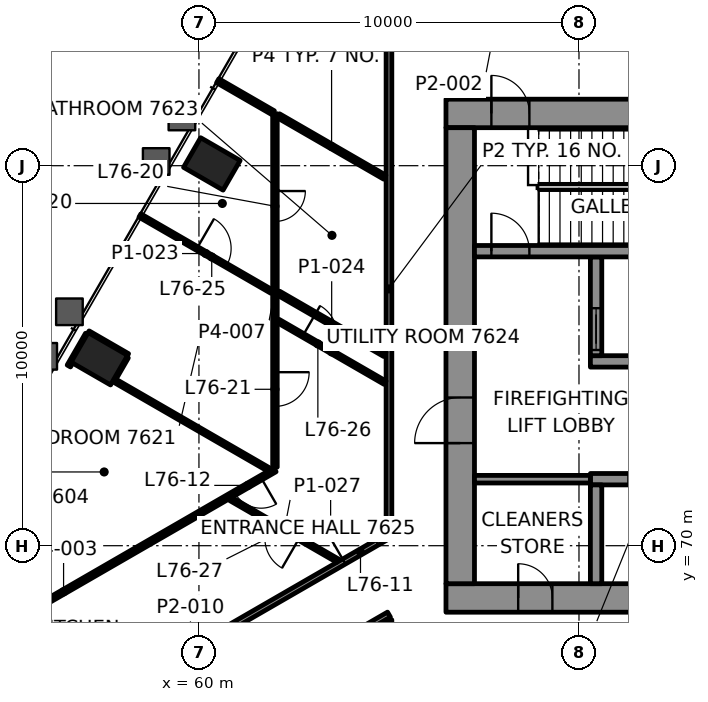
"""IFC4 building model, lengths in metres.
Left out: names, types, materials, properties, quantities, classifications, styles, units other than length and angle.
Written with IfcOpenShell. Run it as: python <this file> out.ifc"""

import sys

from ifc_helpers import new_model, si_unit, direction, frame, frame_2d, origin, origin_2d, place, context, subcontext, project, spatial, rectangle, hollow_rectangle, extrude, element, fill, save


model = new_model("IFC4")
c1 = context("Model", 3, precision=1e-05, world=origin(), true_north=direction((0.0, 1.0)))
c2 = subcontext(c1, "Body", "Model", "MODEL_VIEW")
j1 = project(units=[si_unit("LENGTHUNIT", "METRE"), si_unit("PLANEANGLEUNIT", "RADIAN")], contexts=[c1])
p1 = place(None, origin())
s1 = spatial("IfcSite", under=j1, at=p1, CompositionType="ELEMENT")
p2 = place(p1, origin())
s2 = spatial("IfcBuilding", under=s1, at=p2, CompositionType="ELEMENT")
p3 = place(p2, frame((0.0, 0.0, 312.6)))
s3 = spatial("IfcBuildingStorey", under=s2, at=p3, CompositionType="ELEMENT", Elevation=312.6)
for number, where, z_axis, x_axis in (
    (1, (60.339, 80.046, -0.0), (0.0, 0.0, 1.0), (-0.5, -0.866, 0.0)),
    (2, (57.379, 74.919, -0.0), (0.0, 0.0, 1.0), (-0.5, -0.866, 0.0)),
):
    element("IfcColumn", number, at=place(p3, frame(where, z_axis=z_axis, x_axis=x_axis)), inside=s3, PredefinedType="COLUMN", context=c2, shape_type="SweptSolid", body=[
        extrude(hollow_rectangle(XDim=0.9, YDim=1.2, WallThickness=0.06, at=origin_2d()), origin(), (0.0, 0.0, 1.0), 3.5),
    ])
p4 = place(p3, frame((66.5, 68.625, 0.0), z_axis=(0.0, 0.0, 1.0), x_axis=(1.0, 0.0, 0.0)))
e3 = element("IfcWall", 3, at=p4, inside=s3, PredefinedType="SHEAR", context=c2, shape_type="SweptSolid", body=[
    extrude(rectangle(XDim=17.0, YDim=0.75, at=frame_2d((8.5, 0.0))), origin(), (0.0, 0.0, 1.0), 3.3),
])
p5 = place(p4, frame((1.9, 0.0, 0.0)))
e4 = element("IfcOpeningElement", 4, at=p5, cuts=e3, PredefinedType="OPENING", context=c2, shape_type="SweptSolid", body=[
    extrude(rectangle(XDim=0.9, YDim=2.1, at=frame_2d((0.45, 1.05))), frame((0.0, 0.385, 0.0), z_axis=(0.0, -1.0, 0.0), x_axis=(1.0, 0.0, 0.0)), (0.0, 0.0, 1.0), 0.77),
])
p6 = place(p3, frame((66.5, 81.375, 0.0), z_axis=(0.0, 0.0, 1.0), x_axis=(1.0, 0.0, 0.0)))
e5 = element("IfcWall", 5, at=p6, inside=s3, PredefinedType="SHEAR", context=c2, shape_type="SweptSolid", body=[
    extrude(rectangle(XDim=17.0, YDim=0.75, at=frame_2d((8.5, 0.0))), origin(), (0.0, 0.0, 1.0), 3.3),
])
p7 = place(p6, frame((1.195, 0.0, 0.0)))
e6 = element("IfcOpeningElement", 6, at=p7, cuts=e5, PredefinedType="OPENING", context=c2, shape_type="SweptSolid", body=[
    extrude(rectangle(XDim=1.0, YDim=2.1, at=frame_2d((0.5, 1.05))), frame((0.0, 0.385, 0.0), z_axis=(0.0, -1.0, 0.0), x_axis=(1.0, 0.0, 0.0)), (0.0, 0.0, 1.0), 0.77),
])
p8 = place(p6, frame((15.005, 0.0, 0.0)))
e7 = element("IfcOpeningElement", 7, at=p8, cuts=e5, PredefinedType="OPENING", context=c2, shape_type="SweptSolid", body=[
    extrude(rectangle(XDim=1.0, YDim=2.1, at=frame_2d((0.5, 1.05))), frame((0.0, 0.385, 0.0), z_axis=(0.0, -1.0, 0.0), x_axis=(1.0, 0.0, 0.0)), (0.0, 0.0, 1.0), 0.77),
])
p9 = place(p6, frame((8.15, 0.0, 0.0)))
e8 = element("IfcOpeningElement", 8, at=p9, cuts=e5, PredefinedType="OPENING", context=c2, shape_type="SweptSolid", body=[
    extrude(rectangle(XDim=0.9, YDim=2.1, at=frame_2d((0.45, 1.05))), frame((0.0, 0.385, 0.0), z_axis=(0.0, -1.0, 0.0), x_axis=(1.0, 0.0, 0.0)), (0.0, 0.0, 1.0), 0.77),
])
p10 = place(p3, frame((66.875, 69.0, 0.0), z_axis=(0.0, 0.0, 1.0), x_axis=(0.0, 1.0, 0.0)))
e9 = element("IfcWall", 9, at=p10, inside=s3, PredefinedType="SHEAR", context=c2, shape_type="SweptSolid", body=[
    extrude(rectangle(XDim=12.0, YDim=0.75, at=frame_2d((6.0, 0.0))), origin(), (0.0, 0.0, 1.0), 3.3),
])
p11 = place(p10, frame((3.7, 0.0, 0.0)))
e10 = element("IfcOpeningElement", 10, at=p11, cuts=e9, PredefinedType="OPENING", context=c2, shape_type="SweptSolid", body=[
    extrude(rectangle(XDim=1.2, YDim=2.1, at=frame_2d((0.6, 1.05))), frame((0.0, 0.385, 0.0), z_axis=(0.0, -1.0, 0.0), x_axis=(1.0, 0.0, 0.0)), (0.0, 0.0, 1.0), 0.77),
])
p12 = place(p3, frame((70.3, 71.75, 0.0), z_axis=(0.0, 0.0, 1.0), x_axis=(1.0, 0.0, 0.0)))
e11 = element("IfcWall", 11, at=p12, inside=s3, PredefinedType="SHEAR", context=c2, shape_type="SweptSolid", body=[
    extrude(rectangle(XDim=11.5, YDim=0.3, at=frame_2d((5.75, 0.0))), origin(), (0.0, 0.0, 1.0), 3.3),
])
p13 = place(p12, frame((1.0, 0.0, 0.0)))
e12 = element("IfcOpeningElement", 12, at=p13, cuts=e11, PredefinedType="OPENING", context=c2, shape_type="SweptSolid", body=[
    extrude(rectangle(XDim=1.1, YDim=2.1, at=frame_2d((0.55, 1.05))), frame((0.0, 0.16, 0.0), z_axis=(0.0, -1.0, 0.0), x_axis=(1.0, 0.0, 0.0)), (0.0, 0.0, 1.0), 0.32),
])
p14 = place(p12, frame((3.8, 0.0, 0.0)))
e13 = element("IfcOpeningElement", 13, at=p14, cuts=e11, PredefinedType="OPENING", context=c2, shape_type="SweptSolid", body=[
    extrude(rectangle(XDim=1.1, YDim=2.1, at=frame_2d((0.55, 1.05))), frame((0.0, 0.16, 0.0), z_axis=(0.0, -1.0, 0.0), x_axis=(1.0, 0.0, 0.0)), (0.0, 0.0, 1.0), 0.32),
])
p15 = place(p12, frame((6.6, 0.0, 0.0)))
e14 = element("IfcOpeningElement", 14, at=p15, cuts=e11, PredefinedType="OPENING", context=c2, shape_type="SweptSolid", body=[
    extrude(rectangle(XDim=1.1, YDim=2.1, at=frame_2d((0.55, 1.05))), frame((0.0, 0.16, 0.0), z_axis=(0.0, -1.0, 0.0), x_axis=(1.0, 0.0, 0.0)), (0.0, 0.0, 1.0), 0.32),
])
p16 = place(p12, frame((9.4, 0.0, 0.0)))
e15 = element("IfcOpeningElement", 15, at=p16, cuts=e11, PredefinedType="OPENING", context=c2, shape_type="SweptSolid", body=[
    extrude(rectangle(XDim=1.1, YDim=2.1, at=frame_2d((0.55, 1.05))), frame((0.0, 0.16, 0.0), z_axis=(0.0, -1.0, 0.0), x_axis=(1.0, 0.0, 0.0)), (0.0, 0.0, 1.0), 0.32),
])
p17 = place(p3, frame((70.3, 74.85, 0.0), z_axis=(0.0, 0.0, 1.0), x_axis=(1.0, 0.0, 0.0)))
e16 = element("IfcWall", 16, at=p17, inside=s3, PredefinedType="SHEAR", context=c2, shape_type="SweptSolid", body=[
    extrude(rectangle(XDim=5.9, YDim=0.3, at=frame_2d((2.95, 0.0))), origin(), (0.0, 0.0, 1.0), 3.3),
])
p18 = place(p17, frame((3.8, 0.0, 0.0)))
e17 = element("IfcOpeningElement", 17, at=p18, cuts=e16, PredefinedType="OPENING", context=c2, shape_type="SweptSolid", body=[
    extrude(rectangle(XDim=1.1, YDim=2.1, at=frame_2d((0.55, 1.05))), frame((0.0, 0.16, 0.0), z_axis=(0.0, -1.0, 0.0), x_axis=(1.0, 0.0, 0.0)), (0.0, 0.0, 1.0), 0.32),
])
p19 = place(p3, frame((70.45, 69.0, 0.0), z_axis=(0.0, 0.0, 1.0), x_axis=(0.0, 1.0, 0.0)))
e18 = element("IfcWall", 18, at=p19, inside=s3, PredefinedType="SHEAR", context=c2, shape_type="SweptSolid", body=[
    extrude(rectangle(XDim=2.6, YDim=0.3, at=frame_2d((1.3, 0.0))), origin(), (0.0, 0.0, 1.0), 3.3),
])
p20 = place(p3, frame((70.45, 75.0, 0.0), z_axis=(0.0, 0.0, 1.0), x_axis=(0.0, 1.0, 0.0)))
e19 = element("IfcWall", 19, at=p20, inside=s3, PredefinedType="SHEAR", context=c2, shape_type="SweptSolid", body=[
    extrude(rectangle(XDim=2.6, YDim=0.3, at=frame_2d((1.3, 0.0))), origin(), (0.0, 0.0, 1.0), 3.3),
])
p21 = place(p20, frame((0.15, 0.0, 0.0)))
e20 = element("IfcOpeningElement", 20, at=p21, cuts=e19, PredefinedType="OPENING", context=c2, shape_type="SweptSolid", body=[
    extrude(rectangle(XDim=1.1, YDim=2.1, at=frame_2d((0.55, 1.05))), frame((0.0, 0.16, 0.0), z_axis=(0.0, -1.0, 0.0), x_axis=(1.0, 0.0, 0.0)), (0.0, 0.0, 1.0), 0.32),
])
p22 = place(p3, frame((67.25, 77.75, 0.0), z_axis=(0.0, 0.0, 1.0), x_axis=(1.0, 0.0, 0.0)))
e21 = element("IfcWall", 21, at=p22, inside=s3, PredefinedType="SHEAR", context=c2, shape_type="SweptSolid", body=[
    extrude(rectangle(XDim=15.5, YDim=0.3, at=frame_2d((7.75, 0.0))), origin(), (0.0, 0.0, 1.0), 3.3),
])
p23 = place(p22, frame((0.445, 0.0, 0.0)))
e22 = element("IfcOpeningElement", 22, at=p23, cuts=e21, PredefinedType="OPENING", context=c2, shape_type="SweptSolid", body=[
    extrude(rectangle(XDim=1.0, YDim=2.1, at=frame_2d((0.5, 1.05))), frame((0.0, 0.16, 0.0), z_axis=(0.0, -1.0, 0.0), x_axis=(1.0, 0.0, 0.0)), (0.0, 0.0, 1.0), 0.32),
])
p24 = place(p3, frame((65.0, 68.187, 0.0), z_axis=(0.0, 0.0, 1.0), x_axis=(-0.866028339337, -0.499994915439, 0.0)))
e23 = element("IfcWall", 23, at=p24, inside=s3, PredefinedType="PARTITIONING", context=c2, shape_type="SweptSolid", body=[
    extrude(rectangle(XDim=10.937, YDim=0.15, at=frame_2d((5.468, 0.0))), origin(), (0.0, 0.0, 1.0), 2.697),
])
p25 = place(p24, frame((6.943, 0.0, 0.0)))
e24 = element("IfcOpeningElement", 24, at=p25, cuts=e23, PredefinedType="OPENING", context=c2, shape_type="SweptSolid", body=[
    extrude(rectangle(XDim=1.0, YDim=2.1, at=frame_2d((0.5, 1.05))), frame((0.0, 0.085, 0.0), z_axis=(0.0, -1.0, 0.0), x_axis=(1.0, 0.0, 0.0)), (0.0, 0.0, 1.0), 0.17),
])
p26 = place(p3, frame((54.628, 64.278, 0.0), z_axis=(0.0, 0.0, 1.0), x_axis=(0.866033426221, 0.499986104476, 0.0)))
e25 = element("IfcWall", 25, at=p26, inside=s3, PredefinedType="PARTITIONING", context=c2, shape_type="SweptSolid", body=[
    extrude(rectangle(XDim=11.89, YDim=0.15, at=frame_2d((5.945, 0.0))), origin(), (0.0, 0.0, 1.0), 2.7),
])
p27 = place(p26, frame((10.612, 0.0, 0.0)))
e26 = element("IfcOpeningElement", 26, at=p27, cuts=e25, PredefinedType="OPENING", context=c2, shape_type="SweptSolid", body=[
    extrude(rectangle(XDim=1.0, YDim=2.1, at=frame_2d((0.5, 1.05))), frame((0.0, 0.085, 0.0), z_axis=(0.0, -1.0, 0.0), x_axis=(1.0, 0.0, 0.0)), (0.0, 0.0, 1.0), 0.17),
])
p28 = place(p3, frame((62.0, 71.998, 0.0), z_axis=(0.0, 0.0, 1.0), x_axis=(-0.866023842607, -0.500002704028, 0.0)))
e27 = element("IfcWall", 27, at=p28, inside=s3, PredefinedType="PARTITIONING", context=c2, shape_type="SweptSolid", body=[
    extrude(rectangle(XDim=12.845, YDim=0.12, at=frame_2d((6.422, 0.0))), origin(), (0.0, 0.0, 1.0), 2.7),
])
p29 = place(p28, frame((0.421, 0.0, 0.0)))
e28 = element("IfcOpeningElement", 28, at=p29, cuts=e27, PredefinedType="OPENING", context=c2, shape_type="SweptSolid", body=[
    extrude(rectangle(XDim=0.8, YDim=2.1, at=frame_2d((0.4, 1.05))), frame((0.0, 0.07, 0.0), z_axis=(0.0, -1.0, 0.0), x_axis=(1.0, 0.0, 0.0)), (0.0, 0.0, 1.0), 0.14),
])
p30 = place(p28, frame((10.158, 0.0, 0.0)))
e29 = element("IfcOpeningElement", 29, at=p30, cuts=e27, PredefinedType="OPENING", context=c2, shape_type="SweptSolid", body=[
    extrude(rectangle(XDim=0.8, YDim=2.1, at=frame_2d((0.4, 1.05))), frame((0.0, 0.07, 0.0), z_axis=(0.0, -1.0, 0.0), x_axis=(1.0, 0.0, 0.0)), (0.0, 0.0, 1.0), 0.14),
])
p31 = place(p3, frame((57.776, 74.406, 0.0), z_axis=(0.0, 0.0, 1.0), x_axis=(0.500246099629, 0.865883271467, 0.0)))
e30 = element("IfcWall", 30, at=p31, inside=s3, PredefinedType="PARTITIONING", context=c2, shape_type="SweptSolid", body=[
    extrude(rectangle(XDim=0.646, YDim=0.1, at=frame_2d((0.323, 0.0))), origin(), (0.0, 0.0, 1.0), 2.7),
])
p32 = place(p3, frame((56.576, 74.729, 0.0), z_axis=(0.0, 0.0, 1.0), x_axis=(0.500079715141, 0.865979375335, 0.0)))
e31 = element("IfcWall", 31, at=p32, inside=s3, PredefinedType="PARTITIONING", context=c2, shape_type="SweptSolid", body=[
    extrude(rectangle(XDim=0.966, YDim=0.1, at=frame_2d((0.483, 0.0))), origin(), (0.0, 0.0, 1.0), 2.7),
])
p33 = place(p3, frame((65.0, 66.825, 0.0), z_axis=(0.0, 0.0, 1.0), x_axis=(0.0, 1.0, 0.0)))
e32 = element("IfcWall", 32, at=p33, inside=s3, PredefinedType="PARTITIONING", context=c2, shape_type="SweptSolid", body=[
    extrude(rectangle(XDim=1.226, YDim=0.15, at=frame_2d((0.613, 0.0))), origin(), (0.0, 0.0, 1.0), 2.697),
])
p34 = place(p3, frame((65.0, 70.266, 0.0), z_axis=(0.0, 0.0, 1.0), x_axis=(0.0, 1.0, 0.0)))
e33 = element("IfcWall", 33, at=p34, inside=s3, PredefinedType="PARTITIONING", context=c2, shape_type="SweptSolid", body=[
    extrude(rectangle(XDim=12.984, YDim=0.15, at=frame_2d((6.492, 0.0))), origin(), (0.0, 0.0, 1.0), 2.7),
])
p35 = place(p3, frame((62.0, 81.366, 0.0), z_axis=(0.0, 0.0, 1.0), x_axis=(0.0, -1.0, 0.0)))
e34 = element("IfcWall", 34, at=p35, inside=s3, PredefinedType="PARTITIONING", context=c2, shape_type="SweptSolid", body=[
    extrude(rectangle(XDim=9.299, YDim=0.12, at=frame_2d((4.649, 0.0))), origin(), (0.0, 0.0, 1.0), 2.7),
])
p36 = place(p35, frame((2.033, 0.0, 0.0)))
e35 = element("IfcOpeningElement", 35, at=p36, cuts=e34, PredefinedType="OPENING", context=c2, shape_type="SweptSolid", body=[
    extrude(rectangle(XDim=0.8, YDim=2.1, at=frame_2d((0.4, 1.05))), frame((0.0, 0.07, 0.0), z_axis=(0.0, -1.0, 0.0), x_axis=(1.0, 0.0, 0.0)), (0.0, 0.0, 1.0), 0.14),
])
p37 = place(p35, frame((6.8, 0.0, 0.0)))
e36 = element("IfcOpeningElement", 36, at=p37, cuts=e34, PredefinedType="OPENING", context=c2, shape_type="SweptSolid", body=[
    extrude(rectangle(XDim=0.9, YDim=2.1, at=frame_2d((0.45, 1.05))), frame((0.0, 0.07, 0.0), z_axis=(0.0, -1.0, 0.0), x_axis=(1.0, 0.0, 0.0)), (0.0, 0.0, 1.0), 0.14),
])
p38 = place(p3, frame((64.89, 79.697, 0.0), z_axis=(0.0, 0.0, 1.0), x_axis=(-0.866013313631, 0.500020940175, 0.0)))
e37 = element("IfcWall", 37, at=p38, inside=s3, PredefinedType="PARTITIONING", context=c2, shape_type="SweptSolid", body=[
    extrude(rectangle(XDim=3.233, YDim=0.12, at=frame_2d((1.617, 0.0))), origin(), (0.0, 0.0, 1.0), 2.7),
])
p39 = place(p3, frame((64.89, 75.031, 0.0), z_axis=(0.0, 0.0, 1.0), x_axis=(-0.866033195618, 0.499986503906, 0.0)))
e38 = element("IfcWall", 38, at=p39, inside=s3, PredefinedType="PARTITIONING", context=c2, shape_type="SweptSolid", body=[
    extrude(rectangle(XDim=3.228, YDim=0.12, at=frame_2d((1.614, 0.0))), origin(), (0.0, 0.0, 1.0), 2.7),
])
p40 = place(p3, frame((58.447, 78.689, 0.0), z_axis=(0.0, 0.0, 1.0), x_axis=(0.866035275801, -0.499982900776, 0.0)))
e39 = element("IfcWall", 39, at=p40, inside=s3, PredefinedType="PARTITIONING", context=c2, shape_type="SweptSolid", body=[
    extrude(rectangle(XDim=4.003, YDim=0.1, at=frame_2d((2.001, 0.0))), origin(), (0.0, 0.0, 1.0), 2.688),
])
p41 = place(p40, frame((1.732, 0.0, 0.0)))
e40 = element("IfcOpeningElement", 40, at=p41, cuts=e39, PredefinedType="OPENING", context=c2, shape_type="SweptSolid", body=[
    extrude(rectangle(XDim=0.9, YDim=2.1, at=frame_2d((0.45, 1.05))), frame((0.0, 0.06, 0.0), z_axis=(0.0, -1.0, 0.0), x_axis=(1.0, 0.0, 0.0)), (0.0, 0.0, 1.0), 0.12),
])
p42 = place(p3, frame((62.086, 75.912, 0.0), z_axis=(0.0, 0.0, 1.0), x_axis=(0.866032882975, -0.499987045439, 0.0)))
e41 = element("IfcWall", 41, at=p42, inside=s3, PredefinedType="PARTITIONING", context=c2, shape_type="SweptSolid", body=[
    extrude(rectangle(XDim=3.248, YDim=0.1, at=frame_2d((1.624, 0.0))), origin(), (0.0, 0.0, 1.0), 2.7),
])
p43 = place(p42, frame((0.754, 0.0, 0.0)))
e42 = element("IfcOpeningElement", 42, at=p43, cuts=e41, PredefinedType="OPENING", context=c2, shape_type="SweptSolid", body=[
    extrude(rectangle(XDim=0.9, YDim=2.1, at=frame_2d((0.45, 1.05))), frame((0.0, 0.06, 0.0), z_axis=(0.0, -1.0, 0.0), x_axis=(1.0, 0.0, 0.0)), (0.0, 0.0, 1.0), 0.12),
])
p44 = place(p3, frame((58.124, 75.01, 0.0), z_axis=(0.0, 0.0, 1.0), x_axis=(-0.865978732077, 0.500080829057, 0.0)))
e43 = element("IfcWall", 43, at=p44, inside=s3, PredefinedType="PARTITIONING", context=c2, shape_type="SweptSolid", body=[
    extrude(rectangle(XDim=1.199, YDim=0.1, at=frame_2d((0.6, 0.0))), origin(), (0.0, 0.0, 1.0), 2.688),
])
p45 = place(p3, frame((61.837, 72.003, 0.0), z_axis=(0.0, 0.0, 1.0), x_axis=(-0.86602790099, 0.499995674689, 0.0)))
e44 = element("IfcWall", 44, at=p45, inside=s3, PredefinedType="PARTITIONING", context=c2, shape_type="SweptSolid", body=[
    extrude(rectangle(XDim=4.718, YDim=0.1, at=frame_2d((2.359, 0.0))), origin(), (0.0, 0.0, 1.0), 2.7),
])
p46 = place(p3, frame((63.652, 69.604, 0.0), z_axis=(0.0, 0.0, 1.0), x_axis=(-0.866032882975, 0.499987045439, 0.0)))
e45 = element("IfcWall", 45, at=p46, inside=s3, PredefinedType="PARTITIONING", context=c2, shape_type="SweptSolid", body=[
    extrude(rectangle(XDim=3.248, YDim=0.1, at=frame_2d((1.624, 0.0))), origin(), (0.0, 0.0, 1.0), 2.7),
])
p47 = place(p46, frame((1.174, 0.0, 0.0)))
e46 = element("IfcOpeningElement", 46, at=p47, cuts=e45, PredefinedType="OPENING", context=c2, shape_type="SweptSolid", body=[
    extrude(rectangle(XDim=0.9, YDim=2.1, at=frame_2d((0.45, 1.05))), frame((0.0, 0.06, 0.0), z_axis=(0.0, -1.0, 0.0), x_axis=(1.0, 0.0, 0.0)), (0.0, 0.0, 1.0), 0.12),
])
p48 = place(p3, frame((61.955, 81.392, 0.0), z_axis=(0.0, 0.0, 1.0), x_axis=(-0.866033677446, 0.499985669323, 0.0)))
e47 = element("IfcWall", 47, at=p48, inside=s3, PredefinedType="PARTITIONING", context=c2, shape_type="SweptSolid", body=[
    extrude(rectangle(XDim=1.686, YDim=0.12, at=frame_2d((0.843, 0.0))), origin(), (0.0, 0.0, 1.0), 2.688),
])
p49 = place(p3, frame((67.25, 71.75, 0.0), z_axis=(0.0, 0.0, 1.0), x_axis=(1.0, 0.0, 0.0)))
e48 = element("IfcWall", 48, at=p49, inside=s3, PredefinedType="PARTITIONING", context=c2, shape_type="SweptSolid", body=[
    extrude(rectangle(XDim=3.05, YDim=0.2, at=frame_2d((1.525, 0.0))), origin(), (0.0, 0.0, 1.0), 3.3),
])
p50 = place(p27, origin())
e49 = element("IfcDoor", 49, at=p50, inside=s3, OperationType="SINGLE_SWING_RIGHT", PredefinedType="DOOR", context=c2, shape_type="SweptSolid", body=[
    extrude(rectangle(XDim=1.0, YDim=2.1, at=frame_2d((0.5, 1.05))), frame((0.0, 0.025, 0.0), z_axis=(0.0, -1.0, 0.0), x_axis=(1.0, 0.0, 0.0)), (0.0, 0.0, 1.0), 0.05),
])
fill(e26, e49)
p51 = place(p29, origin())
e50 = element("IfcDoor", 50, at=p51, inside=s3, OperationType="SINGLE_SWING_RIGHT", PredefinedType="DOOR", context=c2, shape_type="SweptSolid", body=[
    extrude(rectangle(XDim=0.8, YDim=2.1, at=frame_2d((0.4, 1.05))), frame((0.0, 0.025, 0.0), z_axis=(0.0, -1.0, 0.0), x_axis=(1.0, 0.0, 0.0)), (0.0, 0.0, 1.0), 0.05),
])
fill(e28, e50)
p52 = place(p36, origin())
e51 = element("IfcDoor", 51, at=p52, inside=s3, OperationType="SINGLE_SWING_RIGHT", PredefinedType="DOOR", context=c2, shape_type="SweptSolid", body=[
    extrude(rectangle(XDim=0.8, YDim=2.1, at=frame_2d((0.4, 1.05))), frame((0.0, 0.025, 0.0), z_axis=(0.0, -1.0, 0.0), x_axis=(1.0, 0.0, 0.0)), (0.0, 0.0, 1.0), 0.05),
])
fill(e35, e51)
p53 = place(p37, origin())
e52 = element("IfcDoor", 52, at=p53, inside=s3, OperationType="SINGLE_SWING_RIGHT", PredefinedType="DOOR", context=c2, shape_type="SweptSolid", body=[
    extrude(rectangle(XDim=0.9, YDim=2.1, at=frame_2d((0.45, 1.05))), frame((0.0, 0.025, 0.0), z_axis=(0.0, -1.0, 0.0), x_axis=(1.0, 0.0, 0.0)), (0.0, 0.0, 1.0), 0.05),
])
fill(e36, e52)
p54 = place(p41, origin())
e53 = element("IfcDoor", 53, at=p54, inside=s3, OperationType="SINGLE_SWING_LEFT", PredefinedType="DOOR", context=c2, shape_type="SweptSolid", body=[
    extrude(rectangle(XDim=0.9, YDim=2.1, at=frame_2d((0.45, 1.05))), frame((0.0, 0.025, 0.0), z_axis=(0.0, -1.0, 0.0), x_axis=(1.0, 0.0, 0.0)), (0.0, 0.0, 1.0), 0.05),
])
fill(e40, e53)
p55 = place(p43, origin())
e54 = element("IfcDoor", 54, at=p55, inside=s3, OperationType="SINGLE_SWING_LEFT", PredefinedType="DOOR", context=c2, shape_type="SweptSolid", body=[
    extrude(rectangle(XDim=0.9, YDim=2.1, at=frame_2d((0.45, 1.05))), frame((0.0, 0.025, 0.0), z_axis=(0.0, -1.0, 0.0), x_axis=(1.0, 0.0, 0.0)), (0.0, 0.0, 1.0), 0.05),
])
fill(e42, e54)
p56 = place(p47, origin())
e55 = element("IfcDoor", 55, at=p56, inside=s3, OperationType="SINGLE_SWING_RIGHT", PredefinedType="DOOR", context=c2, shape_type="SweptSolid", body=[
    extrude(rectangle(XDim=0.9, YDim=2.1, at=frame_2d((0.45, 1.05))), frame((0.0, 0.025, 0.0), z_axis=(0.0, -1.0, 0.0), x_axis=(1.0, 0.0, 0.0)), (0.0, 0.0, 1.0), 0.05),
])
fill(e46, e55)
p57 = place(p21, origin())
e56 = element("IfcDoor", 56, at=p57, inside=s3, OperationType="DOUBLE_DOOR_SLIDING", PredefinedType="DOOR", context=c2, shape_type="SweptSolid", body=[
    extrude(rectangle(XDim=1.1, YDim=2.1, at=frame_2d((0.55, 1.05))), frame((0.0, 0.025, 0.0), z_axis=(0.0, -1.0, 0.0), x_axis=(1.0, 0.0, 0.0)), (0.0, 0.0, 1.0), 0.05),
])
fill(e20, e56)
p58 = place(p23, origin())
e57 = element("IfcDoor", 57, at=p58, inside=s3, OperationType="SINGLE_SWING_LEFT", PredefinedType="DOOR", context=c2, shape_type="SweptSolid", body=[
    extrude(rectangle(XDim=1.0, YDim=2.1, at=frame_2d((0.5, 1.05))), frame((0.0, 0.025, 0.0), z_axis=(0.0, -1.0, 0.0), x_axis=(1.0, 0.0, 0.0)), (0.0, 0.0, 1.0), 0.05),
])
fill(e22, e57)
p59 = place(p7, origin())
e58 = element("IfcDoor", 58, at=p59, inside=s3, OperationType="SINGLE_SWING_RIGHT", PredefinedType="DOOR", context=c2, shape_type="SweptSolid", body=[
    extrude(rectangle(XDim=1.0, YDim=2.1, at=frame_2d((0.5, 1.05))), frame((0.0, 0.095, 0.0), z_axis=(0.0, -1.0, 0.0), x_axis=(1.0, 0.0, 0.0)), (0.0, 0.0, 1.0), 0.19),
])
fill(e6, e58)
p60 = place(p11, origin())
e59 = element("IfcDoor", 59, at=p60, inside=s3, OperationType="SINGLE_SWING_RIGHT", PredefinedType="DOOR", context=c2, shape_type="SweptSolid", body=[
    extrude(rectangle(XDim=1.2, YDim=2.1, at=frame_2d((0.6, 1.05))), frame((0.0, 0.095, 0.0), z_axis=(0.0, -1.0, 0.0), x_axis=(1.0, 0.0, 0.0)), (0.0, 0.0, 1.0), 0.19),
])
fill(e10, e59)
p61 = place(p5, origin())
e60 = element("IfcDoor", 60, at=p61, inside=s3, OperationType="SINGLE_SWING_RIGHT", PredefinedType="DOOR", context=c2, shape_type="SweptSolid", body=[
    extrude(rectangle(XDim=0.9, YDim=2.1, at=frame_2d((0.45, 1.05))), frame((0.0, 0.095, 0.0), z_axis=(0.0, -1.0, 0.0), x_axis=(1.0, 0.0, 0.0)), (0.0, 0.0, 1.0), 0.19),
])
fill(e4, e60)
save(model, sys.argv[1])
